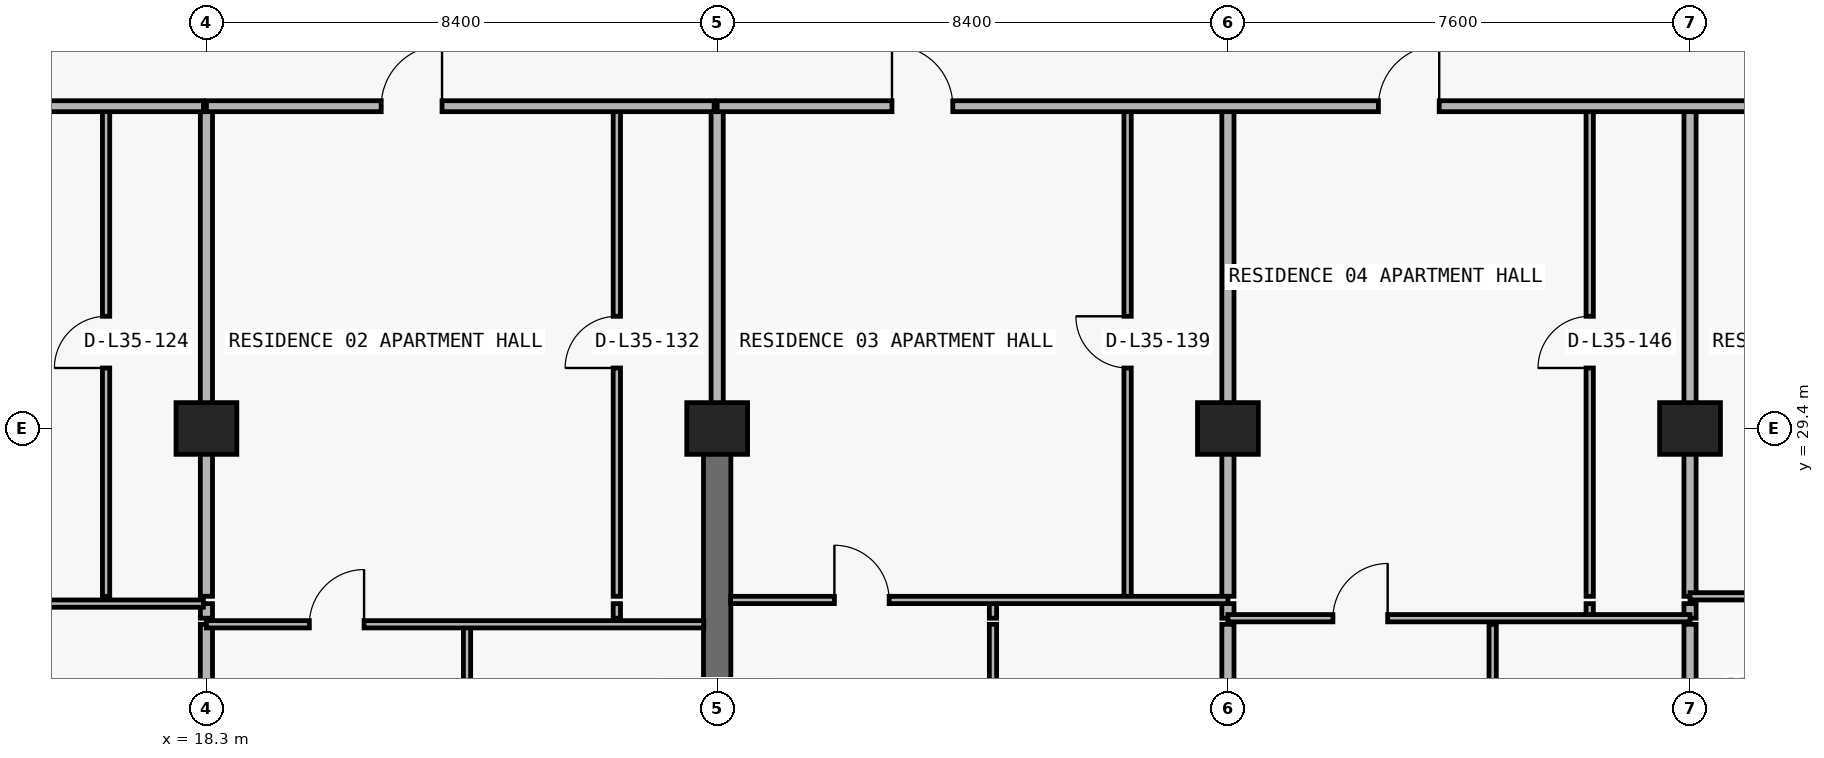
"""IFC4 building model, lengths in metres.
Left out: names, types, materials, properties, quantities, classifications, styles, units other than length and angle.
Written with IfcOpenShell. Run it as: python <this file> out.ifc"""

import sys

from ifc_helpers import new_model, si_unit, direction, frame, frame_2d, origin, origin_2d, place, context, subcontext, project, spatial, rectangle, extrude, element, fill, save


model = new_model("IFC4")
c1 = context("Model", 3, precision=1e-05, world=origin(), true_north=direction((0.0, 1.0)))
c2 = subcontext(c1, "Body", "Model", "MODEL_VIEW")
j1 = project(units=[si_unit("LENGTHUNIT", "METRE"), si_unit("PLANEANGLEUNIT", "RADIAN")], contexts=[c1])
p1 = place(None, origin())
s1 = spatial("IfcSite", under=j1, at=p1, CompositionType="ELEMENT")
p2 = place(p1, origin())
s2 = spatial("IfcBuilding", under=s1, at=p2, CompositionType="ELEMENT")
p3 = place(p2, frame((0.0, 0.0, 129.0)))
s3 = spatial("IfcBuildingStorey", under=s2, at=p3, CompositionType="ELEMENT", Elevation=129.0)
for number, where, z_axis, x_axis in (
    (1, (18.3, 29.4, 0.0), (0.0, 0.0, 1.0), (1.0, 0.0, 0.0)),
    (2, (26.7, 29.4, 0.0), (0.0, 0.0, 1.0), (1.0, 0.0, 0.0)),
    (3, (35.1, 29.4, 0.0), (0.0, 0.0, 1.0), (1.0, 0.0, 0.0)),
    (4, (42.7, 29.4, 0.0), (0.0, 0.0, 1.0), (1.0, 0.0, 0.0)),
):
    element("IfcColumn", number, at=place(p3, frame(where, z_axis=z_axis, x_axis=x_axis)), inside=s3, PredefinedType="COLUMN", context=c2, shape_type="SweptSolid", body=[
        extrude(rectangle(XDim=1.0, YDim=0.85, at=origin_2d()), origin(), (0.0, 0.0, 1.0), 3.05),
    ])
p4 = place(p3, frame((26.7, 20.8, 0.0), z_axis=(0.0, 0.0, 1.0), x_axis=(0.0, 1.0, 0.0)))
e5 = element("IfcWall", 5, at=p4, inside=s3, PredefinedType="SHEAR", context=c2, shape_type="SweptSolid", body=[
    extrude(rectangle(XDim=8.6, YDim=0.45, at=frame_2d((4.3, 0.0))), origin(), (0.0, 0.0, 1.0), 3.05),
])
p5 = place(p3, frame((16.65, 26.64, 0.0), z_axis=(0.0, 0.0, 1.0), x_axis=(0.0, 1.0, 0.0)))
e6 = element("IfcWall", 6, at=p5, inside=s3, PredefinedType="PARTITIONING", context=c2, shape_type="SweptSolid", body=[
    extrude(rectangle(XDim=8.06, YDim=0.12, at=frame_2d((4.03, 0.0))), origin(), (0.0, 0.0, 1.0), 3.05),
])
p6 = place(p5, frame((3.755, 0.0, 0.0)))
e7 = element("IfcOpeningElement", 7, at=p6, cuts=e6, PredefinedType="OPENING", context=c2, shape_type="SweptSolid", body=[
    extrude(rectangle(XDim=0.85, YDim=2.1, at=frame_2d((0.425, 1.05))), frame((0.0, 0.07, 0.0), z_axis=(0.0, -1.0, 0.0), x_axis=(1.0, 0.0, 0.0)), (0.0, 0.0, 1.0), 0.14),
])
p7 = place(p3, frame((18.3, 21.49, 0.0), z_axis=(0.0, 0.0, 1.0), x_axis=(0.0, 1.0, 0.0)))
e8 = element("IfcWall", 8, at=p7, inside=s3, PredefinedType="PARTITIONING", context=c2, shape_type="SweptSolid", body=[
    extrude(rectangle(XDim=4.69, YDim=0.2, at=frame_2d((2.345, 0.0))), origin(), (0.0, 0.0, 1.0), 2.174),
])
p8 = place(p3, frame((18.3, 26.28, 0.0), z_axis=(0.0, 0.0, 1.0), x_axis=(0.0, 1.0, 0.0)))
e9 = element("IfcWall", 9, at=p8, inside=s3, PredefinedType="PARTITIONING", context=c2, shape_type="SweptSolid", body=[
    extrude(rectangle(XDim=0.24, YDim=0.2, at=frame_2d((0.12, 0.0))), origin(), (0.0, 0.0, 1.0), 2.174),
])
p9 = place(p3, frame((18.3, 26.64, 0.0), z_axis=(0.0, 0.0, 1.0), x_axis=(0.0, 1.0, 0.0)))
e10 = element("IfcWall", 10, at=p9, inside=s3, PredefinedType="PARTITIONING", context=c2, shape_type="SweptSolid", body=[
    extrude(rectangle(XDim=8.06, YDim=0.2, at=frame_2d((4.03, 0.0))), origin(), (0.0, 0.0, 1.0), 2.174),
])
p10 = place(p3, frame((22.586, 21.49, 0.0), z_axis=(0.0, 0.0, 1.0), x_axis=(0.0, 1.0, 0.0)))
e11 = element("IfcWall", 11, at=p10, inside=s3, PredefinedType="PARTITIONING", context=c2, shape_type="SweptSolid", body=[
    extrude(rectangle(XDim=4.69, YDim=0.12, at=frame_2d((2.345, 0.0))), origin(), (0.0, 0.0, 1.0), 3.05),
])
p11 = place(p10, frame((1.895, 0.0, 0.0)))
e12 = element("IfcOpeningElement", 12, at=p11, cuts=e11, PredefinedType="OPENING", context=c2, shape_type="SweptSolid", body=[
    extrude(rectangle(XDim=0.9, YDim=2.15, at=frame_2d((0.45, 1.075))), frame((0.0, 0.07, 0.0), z_axis=(0.0, -1.0, 0.0), x_axis=(1.0, 0.0, 0.0)), (0.0, 0.0, 1.0), 0.14),
])
p12 = place(p3, frame((25.05, 26.28, 0.0), z_axis=(0.0, 0.0, 1.0), x_axis=(0.0, 1.0, 0.0)))
e13 = element("IfcWall", 13, at=p12, inside=s3, PredefinedType="PARTITIONING", context=c2, shape_type="SweptSolid", body=[
    extrude(rectangle(XDim=0.24, YDim=0.12, at=frame_2d((0.12, 0.0))), origin(), (0.0, 0.0, 1.0), 3.05),
])
p13 = place(p3, frame((25.05, 26.64, 0.0), z_axis=(0.0, 0.0, 1.0), x_axis=(0.0, 1.0, 0.0)))
e14 = element("IfcWall", 14, at=p13, inside=s3, PredefinedType="PARTITIONING", context=c2, shape_type="SweptSolid", body=[
    extrude(rectangle(XDim=8.06, YDim=0.12, at=frame_2d((4.03, 0.0))), origin(), (0.0, 0.0, 1.0), 3.05),
])
p14 = place(p13, frame((3.755, 0.0, 0.0)))
e15 = element("IfcOpeningElement", 15, at=p14, cuts=e14, PredefinedType="OPENING", context=c2, shape_type="SweptSolid", body=[
    extrude(rectangle(XDim=0.85, YDim=2.1, at=frame_2d((0.425, 1.05))), frame((0.0, 0.07, 0.0), z_axis=(0.0, -1.0, 0.0), x_axis=(1.0, 0.0, 0.0)), (0.0, 0.0, 1.0), 0.14),
])
p15 = place(p3, frame((26.7, 29.405, 0.0), z_axis=(0.0, 0.0, 1.0), x_axis=(0.0, 1.0, 0.0)))
e16 = element("IfcWall", 16, at=p15, inside=s3, PredefinedType="PARTITIONING", context=c2, shape_type="SweptSolid", body=[
    extrude(rectangle(XDim=5.295, YDim=0.2, at=frame_2d((2.647, 0.0))), origin(), (0.0, 0.0, 1.0), 2.335),
])
p16 = place(p3, frame((31.236, 21.49, 0.0), z_axis=(0.0, 0.0, 1.0), x_axis=(0.0, 1.0, 0.0)))
e17 = element("IfcWall", 17, at=p16, inside=s3, PredefinedType="PARTITIONING", context=c2, shape_type="SweptSolid", body=[
    extrude(rectangle(XDim=4.69, YDim=0.12, at=frame_2d((2.345, 0.0))), origin(), (0.0, 0.0, 1.0), 3.05),
])
p17 = place(p16, frame((1.895, 0.0, 0.0)))
e18 = element("IfcOpeningElement", 18, at=p17, cuts=e17, PredefinedType="OPENING", context=c2, shape_type="SweptSolid", body=[
    extrude(rectangle(XDim=0.9, YDim=2.15, at=frame_2d((0.45, 1.075))), frame((0.0, 0.07, 0.0), z_axis=(0.0, -1.0, 0.0), x_axis=(1.0, 0.0, 0.0)), (0.0, 0.0, 1.0), 0.14),
])
p18 = place(p3, frame((31.236, 26.28, 0.0), z_axis=(0.0, 0.0, 1.0), x_axis=(0.0, 1.0, 0.0)))
e19 = element("IfcWall", 19, at=p18, inside=s3, PredefinedType="PARTITIONING", context=c2, shape_type="SweptSolid", body=[
    extrude(rectangle(XDim=0.24, YDim=0.12, at=frame_2d((0.12, 0.0))), origin(), (0.0, 0.0, 1.0), 3.05),
])
p19 = place(p3, frame((33.45, 26.64, 0.0), z_axis=(0.0, 0.0, 1.0), x_axis=(0.0, 1.0, 0.0)))
e20 = element("IfcWall", 20, at=p19, inside=s3, PredefinedType="PARTITIONING", context=c2, shape_type="SweptSolid", body=[
    extrude(rectangle(XDim=8.06, YDim=0.12, at=frame_2d((4.03, 0.0))), origin(), (0.0, 0.0, 1.0), 3.05),
])
p20 = place(p19, frame((3.755, 0.0, 0.0)))
e21 = element("IfcOpeningElement", 21, at=p20, cuts=e20, PredefinedType="OPENING", context=c2, shape_type="SweptSolid", body=[
    extrude(rectangle(XDim=0.85, YDim=2.1, at=frame_2d((0.425, 1.05))), frame((0.0, 0.07, 0.0), z_axis=(0.0, -1.0, 0.0), x_axis=(1.0, 0.0, 0.0)), (0.0, 0.0, 1.0), 0.14),
])
p21 = place(p3, frame((35.1, 21.49, 0.0), z_axis=(0.0, 0.0, 1.0), x_axis=(0.0, 1.0, 0.0)))
e22 = element("IfcWall", 22, at=p21, inside=s3, PredefinedType="PARTITIONING", context=c2, shape_type="SweptSolid", body=[
    extrude(rectangle(XDim=4.69, YDim=0.2, at=frame_2d((2.345, 0.0))), origin(), (0.0, 0.0, 1.0), 2.174),
])
p22 = place(p3, frame((35.1, 26.28, 0.0), z_axis=(0.0, 0.0, 1.0), x_axis=(0.0, 1.0, 0.0)))
e23 = element("IfcWall", 23, at=p22, inside=s3, PredefinedType="PARTITIONING", context=c2, shape_type="SweptSolid", body=[
    extrude(rectangle(XDim=0.24, YDim=0.2, at=frame_2d((0.12, 0.0))), origin(), (0.0, 0.0, 1.0), 2.174),
])
p23 = place(p3, frame((35.1, 26.64, 0.0), z_axis=(0.0, 0.0, 1.0), x_axis=(0.0, 1.0, 0.0)))
e24 = element("IfcWall", 24, at=p23, inside=s3, PredefinedType="PARTITIONING", context=c2, shape_type="SweptSolid", body=[
    extrude(rectangle(XDim=8.06, YDim=0.2, at=frame_2d((4.03, 0.0))), origin(), (0.0, 0.0, 1.0), 2.174),
])
p24 = place(p3, frame((39.454, 21.49, 0.0), z_axis=(0.0, 0.0, 1.0), x_axis=(0.0, 1.0, 0.0)))
e25 = element("IfcWall", 25, at=p24, inside=s3, PredefinedType="PARTITIONING", context=c2, shape_type="SweptSolid", body=[
    extrude(rectangle(XDim=4.69, YDim=0.12, at=frame_2d((2.345, 0.0))), origin(), (0.0, 0.0, 1.0), 3.05),
])
p25 = place(p24, frame((1.895, 0.0, 0.0)))
e26 = element("IfcOpeningElement", 26, at=p25, cuts=e25, PredefinedType="OPENING", context=c2, shape_type="SweptSolid", body=[
    extrude(rectangle(XDim=0.9, YDim=2.15, at=frame_2d((0.45, 1.075))), frame((0.0, 0.07, 0.0), z_axis=(0.0, -1.0, 0.0), x_axis=(1.0, 0.0, 0.0)), (0.0, 0.0, 1.0), 0.14),
])
p26 = place(p3, frame((41.05, 26.28, 0.0), z_axis=(0.0, 0.0, 1.0), x_axis=(0.0, 1.0, 0.0)))
e27 = element("IfcWall", 27, at=p26, inside=s3, PredefinedType="PARTITIONING", context=c2, shape_type="SweptSolid", body=[
    extrude(rectangle(XDim=0.24, YDim=0.12, at=frame_2d((0.12, 0.0))), origin(), (0.0, 0.0, 1.0), 3.05),
])
p27 = place(p3, frame((41.05, 26.64, 0.0), z_axis=(0.0, 0.0, 1.0), x_axis=(0.0, 1.0, 0.0)))
e28 = element("IfcWall", 28, at=p27, inside=s3, PredefinedType="PARTITIONING", context=c2, shape_type="SweptSolid", body=[
    extrude(rectangle(XDim=8.06, YDim=0.12, at=frame_2d((4.03, 0.0))), origin(), (0.0, 0.0, 1.0), 3.05),
])
p28 = place(p27, frame((3.755, 0.0, 0.0)))
e29 = element("IfcOpeningElement", 29, at=p28, cuts=e28, PredefinedType="OPENING", context=c2, shape_type="SweptSolid", body=[
    extrude(rectangle(XDim=0.85, YDim=2.1, at=frame_2d((0.425, 1.05))), frame((0.0, 0.07, 0.0), z_axis=(0.0, -1.0, 0.0), x_axis=(1.0, 0.0, 0.0)), (0.0, 0.0, 1.0), 0.14),
])
p29 = place(p3, frame((42.7, 21.49, 0.0), z_axis=(0.0, 0.0, 1.0), x_axis=(0.0, 1.0, 0.0)))
e30 = element("IfcWall", 30, at=p29, inside=s3, PredefinedType="PARTITIONING", context=c2, shape_type="SweptSolid", body=[
    extrude(rectangle(XDim=4.69, YDim=0.2, at=frame_2d((2.345, 0.0))), origin(), (0.0, 0.0, 1.0), 2.174),
])
p30 = place(p3, frame((42.7, 26.28, 0.0), z_axis=(0.0, 0.0, 1.0), x_axis=(0.0, 1.0, 0.0)))
e31 = element("IfcWall", 31, at=p30, inside=s3, PredefinedType="PARTITIONING", context=c2, shape_type="SweptSolid", body=[
    extrude(rectangle(XDim=0.24, YDim=0.2, at=frame_2d((0.12, 0.0))), origin(), (0.0, 0.0, 1.0), 2.174),
])
p31 = place(p3, frame((42.7, 26.64, 0.0), z_axis=(0.0, 0.0, 1.0), x_axis=(0.0, 1.0, 0.0)))
e32 = element("IfcWall", 32, at=p31, inside=s3, PredefinedType="PARTITIONING", context=c2, shape_type="SweptSolid", body=[
    extrude(rectangle(XDim=8.06, YDim=0.2, at=frame_2d((4.03, 0.0))), origin(), (0.0, 0.0, 1.0), 2.174),
])
p32 = place(p3, frame((18.3, 26.18, 0.0), z_axis=(0.0, 0.0, 1.0), x_axis=(1.0, 0.0, 0.0)))
e33 = element("IfcWall", 33, at=p32, inside=s3, PredefinedType="PARTITIONING", context=c2, shape_type="SweptSolid", body=[
    extrude(rectangle(XDim=8.18, YDim=0.12, at=frame_2d((4.09, 0.0))), origin(), (0.0, 0.0, 1.0), 3.05),
])
p33 = place(p32, frame((1.693, 0.0, 0.0)))
e34 = element("IfcOpeningElement", 34, at=p33, cuts=e33, PredefinedType="OPENING", context=c2, shape_type="SweptSolid", body=[
    extrude(rectangle(XDim=0.9, YDim=2.15, at=frame_2d((0.45, 1.075))), frame((0.0, 0.07, 0.0), z_axis=(0.0, -1.0, 0.0), x_axis=(1.0, 0.0, 0.0)), (0.0, 0.0, 1.0), 0.14),
])
p34 = place(p3, frame((35.1, 26.28, 0.0), z_axis=(0.0, 0.0, 1.0), x_axis=(1.0, 0.0, 0.0)))
e35 = element("IfcWall", 35, at=p34, inside=s3, PredefinedType="PARTITIONING", context=c2, shape_type="SweptSolid", body=[
    extrude(rectangle(XDim=7.6, YDim=0.12, at=frame_2d((3.8, 0.0))), origin(), (0.0, 0.0, 1.0), 3.05),
])
p35 = place(p34, frame((1.727, 0.0, 0.0)))
e36 = element("IfcOpeningElement", 36, at=p35, cuts=e35, PredefinedType="OPENING", context=c2, shape_type="SweptSolid", body=[
    extrude(rectangle(XDim=0.9, YDim=2.15, at=frame_2d((0.45, 1.075))), frame((0.0, 0.07, 0.0), z_axis=(0.0, -1.0, 0.0), x_axis=(1.0, 0.0, 0.0)), (0.0, 0.0, 1.0), 0.14),
])
p36 = place(p3, frame((9.9, 26.52, 0.0), z_axis=(0.0, 0.0, 1.0), x_axis=(1.0, 0.0, 0.0)))
e37 = element("IfcWall", 37, at=p36, inside=s3, PredefinedType="PARTITIONING", context=c2, shape_type="SweptSolid", body=[
    extrude(rectangle(XDim=8.35, YDim=0.12, at=frame_2d((4.175, 0.0))), origin(), (0.0, 0.0, 1.0), 3.05),
])
p37 = place(p36, frame((1.943, 0.0, 0.0)))
e38 = element("IfcOpeningElement", 38, at=p37, cuts=e37, PredefinedType="OPENING", context=c2, shape_type="SweptSolid", body=[
    extrude(rectangle(XDim=0.9, YDim=2.15, at=frame_2d((0.45, 1.075))), frame((0.0, 0.07, 0.0), z_axis=(0.0, -1.0, 0.0), x_axis=(1.0, 0.0, 0.0)), (0.0, 0.0, 1.0), 0.14),
])
p38 = place(p3, frame((26.92, 26.58, 0.0), z_axis=(0.0, 0.0, 1.0), x_axis=(1.0, 0.0, 0.0)))
e39 = element("IfcWall", 39, at=p38, inside=s3, PredefinedType="PARTITIONING", context=c2, shape_type="SweptSolid", body=[
    extrude(rectangle(XDim=8.18, YDim=0.12, at=frame_2d((4.09, 0.0))), origin(), (0.0, 0.0, 1.0), 3.05),
])
p39 = place(p38, frame((1.708, 0.0, 0.0)))
e40 = element("IfcOpeningElement", 40, at=p39, cuts=e39, PredefinedType="OPENING", context=c2, shape_type="SweptSolid", body=[
    extrude(rectangle(XDim=0.9, YDim=2.15, at=frame_2d((0.45, 1.075))), frame((0.0, 0.07, 0.0), z_axis=(0.0, -1.0, 0.0), x_axis=(1.0, 0.0, 0.0)), (0.0, 0.0, 1.0), 0.14),
])
p40 = place(p3, frame((42.7, 26.64, 0.0), z_axis=(0.0, 0.0, 1.0), x_axis=(1.0, 0.0, 0.0)))
e41 = element("IfcWall", 41, at=p40, inside=s3, PredefinedType="PARTITIONING", context=c2, shape_type="SweptSolid", body=[
    extrude(rectangle(XDim=8.18, YDim=0.12, at=frame_2d((4.09, 0.0))), origin(), (0.0, 0.0, 1.0), 3.05),
])
p41 = place(p40, frame((1.693, 0.0, 0.0)))
e42 = element("IfcOpeningElement", 42, at=p41, cuts=e41, PredefinedType="OPENING", context=c2, shape_type="SweptSolid", body=[
    extrude(rectangle(XDim=0.9, YDim=2.15, at=frame_2d((0.45, 1.075))), frame((0.0, 0.07, 0.0), z_axis=(0.0, -1.0, 0.0), x_axis=(1.0, 0.0, 0.0)), (0.0, 0.0, 1.0), 0.14),
])
p42 = place(p3, frame((7.705, 34.7, 0.0), z_axis=(0.0, 0.0, 1.0), x_axis=(1.0, 0.0, 0.0)))
e43 = element("IfcWall", 43, at=p42, inside=s3, PredefinedType="PARTITIONING", context=c2, shape_type="SweptSolid", body=[
    extrude(rectangle(XDim=10.545, YDim=0.18, at=frame_2d((5.272, 0.0))), origin(), (0.0, 0.0, 1.0), 3.05),
])
p43 = place(p42, frame((5.07, 0.0, 0.0)))
e44 = element("IfcOpeningElement", 44, at=p43, cuts=e43, PredefinedType="OPENING", context=c2, shape_type="SweptSolid", body=[
    extrude(rectangle(XDim=1.0, YDim=2.2, at=frame_2d((0.5, 1.1))), frame((0.0, 0.1, 0.0), z_axis=(0.0, -1.0, 0.0), x_axis=(1.0, 0.0, 0.0)), (0.0, 0.0, 1.0), 0.2),
])
p44 = place(p3, frame((18.3, 34.7, 0.0), z_axis=(0.0, 0.0, 1.0), x_axis=(1.0, 0.0, 0.0)))
e45 = element("IfcWall", 45, at=p44, inside=s3, PredefinedType="PARTITIONING", context=c2, shape_type="SweptSolid", body=[
    extrude(rectangle(XDim=8.35, YDim=0.18, at=frame_2d((4.175, 0.0))), origin(), (0.0, 0.0, 1.0), 3.05),
])
p45 = place(p44, frame((2.875, 0.0, 0.0)))
e46 = element("IfcOpeningElement", 46, at=p45, cuts=e45, PredefinedType="OPENING", context=c2, shape_type="SweptSolid", body=[
    extrude(rectangle(XDim=1.0, YDim=2.2, at=frame_2d((0.5, 1.1))), frame((0.0, 0.1, 0.0), z_axis=(0.0, -1.0, 0.0), x_axis=(1.0, 0.0, 0.0)), (0.0, 0.0, 1.0), 0.2),
])
p46 = place(p3, frame((26.7, 34.7, 0.0), z_axis=(0.0, 0.0, 1.0), x_axis=(1.0, 0.0, 0.0)))
e47 = element("IfcWall", 47, at=p46, inside=s3, PredefinedType="PARTITIONING", context=c2, shape_type="SweptSolid", body=[
    extrude(rectangle(XDim=32.8, YDim=0.18, at=frame_2d((16.4, 0.0))), origin(), (0.0, 0.0, 1.0), 3.05),
])
p47 = place(p46, frame((2.875, 0.0, 0.0)))
e48 = element("IfcOpeningElement", 48, at=p47, cuts=e47, PredefinedType="OPENING", context=c2, shape_type="SweptSolid", body=[
    extrude(rectangle(XDim=1.0, YDim=2.2, at=frame_2d((0.5, 1.1))), frame((0.0, 0.1, 0.0), z_axis=(0.0, -1.0, 0.0), x_axis=(1.0, 0.0, 0.0)), (0.0, 0.0, 1.0), 0.2),
])
p48 = place(p46, frame((10.875, 0.0, 0.0)))
e49 = element("IfcOpeningElement", 49, at=p48, cuts=e47, PredefinedType="OPENING", context=c2, shape_type="SweptSolid", body=[
    extrude(rectangle(XDim=1.0, YDim=2.2, at=frame_2d((0.5, 1.1))), frame((0.0, 0.1, 0.0), z_axis=(0.0, -1.0, 0.0), x_axis=(1.0, 0.0, 0.0)), (0.0, 0.0, 1.0), 0.2),
])
p49 = place(p46, frame((18.875, 0.0, 0.0)))
e50 = element("IfcOpeningElement", 50, at=p49, cuts=e47, PredefinedType="OPENING", context=c2, shape_type="SweptSolid", body=[
    extrude(rectangle(XDim=1.0, YDim=2.2, at=frame_2d((0.5, 1.1))), frame((0.0, 0.1, 0.0), z_axis=(0.0, -1.0, 0.0), x_axis=(1.0, 0.0, 0.0)), (0.0, 0.0, 1.0), 0.2),
])
p50 = place(p46, frame((27.275, 0.0, 0.0)))
e51 = element("IfcOpeningElement", 51, at=p50, cuts=e47, PredefinedType="OPENING", context=c2, shape_type="SweptSolid", body=[
    extrude(rectangle(XDim=1.0, YDim=2.2, at=frame_2d((0.5, 1.1))), frame((0.0, 0.1, 0.0), z_axis=(0.0, -1.0, 0.0), x_axis=(1.0, 0.0, 0.0)), (0.0, 0.0, 1.0), 0.2),
])
p51 = place(p6, origin())
e52 = element("IfcDoor", 52, at=p51, inside=s3, OperationType="SINGLE_SWING_LEFT", PredefinedType="DOOR", context=c2, shape_type="SweptSolid", body=[
    extrude(rectangle(XDim=0.85, YDim=2.1, at=frame_2d((0.425, 1.05))), frame((0.0, 0.025, 0.0), z_axis=(0.0, -1.0, 0.0), x_axis=(1.0, 0.0, 0.0)), (0.0, 0.0, 1.0), 0.05),
])
fill(e7, e52)
p52 = place(p45, origin())
e53 = element("IfcDoor", 53, at=p52, inside=s3, OperationType="SINGLE_SWING_RIGHT", PredefinedType="DOOR", context=c2, shape_type="SweptSolid", body=[
    extrude(rectangle(XDim=1.0, YDim=2.2, at=frame_2d((0.5, 1.1))), frame((0.0, 0.025, 0.0), z_axis=(0.0, -1.0, 0.0), x_axis=(1.0, 0.0, 0.0)), (0.0, 0.0, 1.0), 0.05),
])
fill(e46, e53)
p53 = place(p14, origin())
e54 = element("IfcDoor", 54, at=p53, inside=s3, OperationType="SINGLE_SWING_LEFT", PredefinedType="DOOR", context=c2, shape_type="SweptSolid", body=[
    extrude(rectangle(XDim=0.85, YDim=2.1, at=frame_2d((0.425, 1.05))), frame((0.0, 0.025, 0.0), z_axis=(0.0, -1.0, 0.0), x_axis=(1.0, 0.0, 0.0)), (0.0, 0.0, 1.0), 0.05),
])
fill(e15, e54)
p54 = place(p33, origin())
e55 = element("IfcDoor", 55, at=p54, inside=s3, OperationType="SINGLE_SWING_RIGHT", PredefinedType="DOOR", context=c2, shape_type="SweptSolid", body=[
    extrude(rectangle(XDim=0.9, YDim=2.15, at=frame_2d((0.45, 1.075))), frame((0.0, 0.025, 0.0), z_axis=(0.0, -1.0, 0.0), x_axis=(1.0, 0.0, 0.0)), (0.0, 0.0, 1.0), 0.05),
])
fill(e34, e55)
p55 = place(p47, origin())
e56 = element("IfcDoor", 56, at=p55, inside=s3, OperationType="SINGLE_SWING_LEFT", PredefinedType="DOOR", context=c2, shape_type="SweptSolid", body=[
    extrude(rectangle(XDim=1.0, YDim=2.2, at=frame_2d((0.5, 1.1))), frame((0.0, 0.025, 0.0), z_axis=(0.0, -1.0, 0.0), x_axis=(1.0, 0.0, 0.0)), (0.0, 0.0, 1.0), 0.05),
])
fill(e48, e56)
p56 = place(p20, origin())
e57 = element("IfcDoor", 57, at=p56, inside=s3, OperationType="SINGLE_SWING_RIGHT", PredefinedType="DOOR", context=c2, shape_type="SweptSolid", body=[
    extrude(rectangle(XDim=0.85, YDim=2.1, at=frame_2d((0.425, 1.05))), frame((0.0, 0.025, 0.0), z_axis=(0.0, -1.0, 0.0), x_axis=(1.0, 0.0, 0.0)), (0.0, 0.0, 1.0), 0.05),
])
fill(e21, e57)
p57 = place(p39, origin())
e58 = element("IfcDoor", 58, at=p57, inside=s3, OperationType="SINGLE_SWING_LEFT", PredefinedType="DOOR", context=c2, shape_type="SweptSolid", body=[
    extrude(rectangle(XDim=0.9, YDim=2.15, at=frame_2d((0.45, 1.075))), frame((0.0, 0.025, 0.0), z_axis=(0.0, -1.0, 0.0), x_axis=(1.0, 0.0, 0.0)), (0.0, 0.0, 1.0), 0.05),
])
fill(e40, e58)
p58 = place(p48, origin())
e59 = element("IfcDoor", 59, at=p58, inside=s3, OperationType="SINGLE_SWING_RIGHT", PredefinedType="DOOR", context=c2, shape_type="SweptSolid", body=[
    extrude(rectangle(XDim=1.0, YDim=2.2, at=frame_2d((0.5, 1.1))), frame((0.0, 0.025, 0.0), z_axis=(0.0, -1.0, 0.0), x_axis=(1.0, 0.0, 0.0)), (0.0, 0.0, 1.0), 0.05),
])
fill(e49, e59)
p59 = place(p28, origin())
e60 = element("IfcDoor", 60, at=p59, inside=s3, OperationType="SINGLE_SWING_LEFT", PredefinedType="DOOR", context=c2, shape_type="SweptSolid", body=[
    extrude(rectangle(XDim=0.85, YDim=2.1, at=frame_2d((0.425, 1.05))), frame((0.0, 0.025, 0.0), z_axis=(0.0, -1.0, 0.0), x_axis=(1.0, 0.0, 0.0)), (0.0, 0.0, 1.0), 0.05),
])
fill(e29, e60)
p60 = place(p35, origin())
e61 = element("IfcDoor", 61, at=p60, inside=s3, OperationType="SINGLE_SWING_RIGHT", PredefinedType="DOOR", context=c2, shape_type="SweptSolid", body=[
    extrude(rectangle(XDim=0.9, YDim=2.15, at=frame_2d((0.45, 1.075))), frame((0.0, 0.025, 0.0), z_axis=(0.0, -1.0, 0.0), x_axis=(1.0, 0.0, 0.0)), (0.0, 0.0, 1.0), 0.05),
])
fill(e36, e61)
save(model, sys.argv[1])
